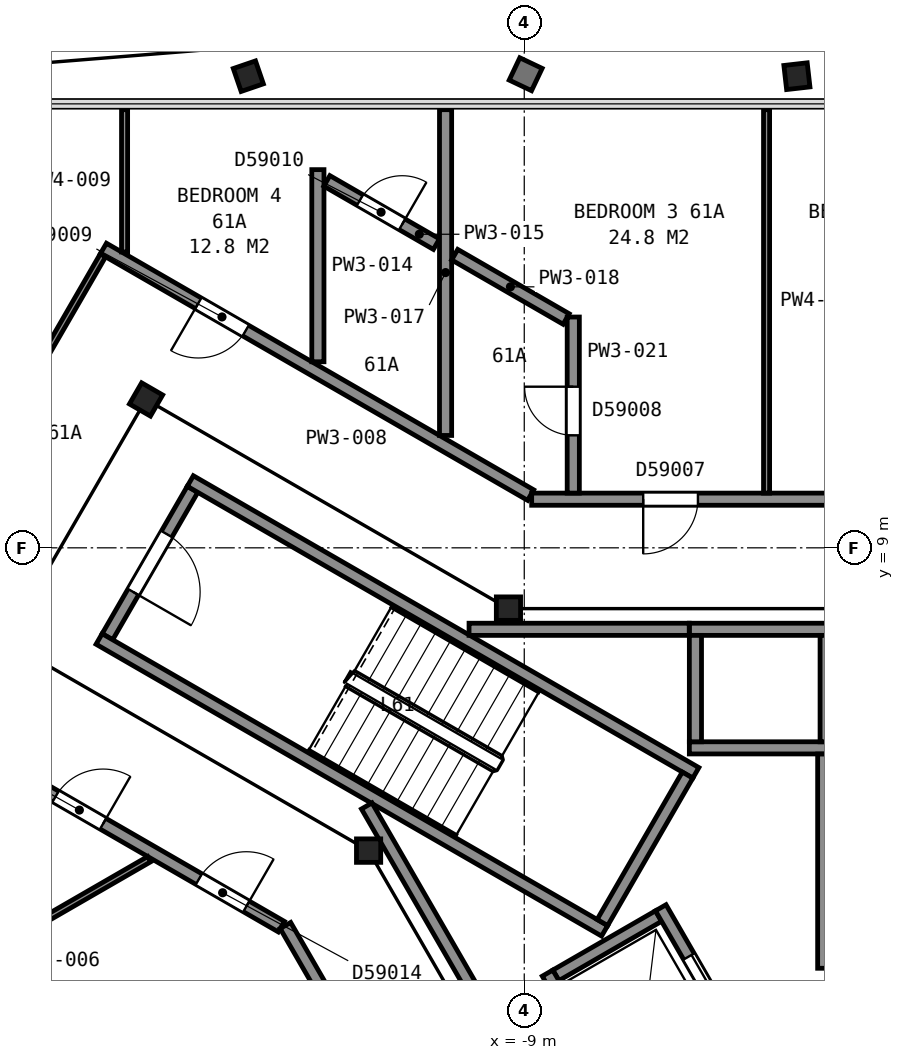
"""IFC4 building model, lengths in metres.
Left out: names, types, materials, properties, quantities, classifications, styles, units other than length and angle.
Written with IfcOpenShell. Run it as: python <this file> out.ifc"""

import sys

from ifc_helpers import new_model, si_unit, direction, frame, frame_2d, origin, origin_2d, place, context, subcontext, project, spatial, rectangle, i_section, extrude, element, fill, save


model = new_model("IFC4")
c1 = context("Model", 3, precision=1e-05, world=origin(), true_north=direction((0.0, 1.0)))
c2 = subcontext(c1, "Body", "Model", "MODEL_VIEW")
j1 = project(units=[si_unit("LENGTHUNIT", "METRE"), si_unit("PLANEANGLEUNIT", "RADIAN")], contexts=[c1])
p1 = place(None, origin())
s1 = spatial("IfcSite", under=j1, at=p1, CompositionType="ELEMENT")
p2 = place(p1, origin())
s2 = spatial("IfcBuilding", under=s1, at=p2, CompositionType="ELEMENT")
p3 = place(p2, frame((0.0, 0.0, 243.4)))
s3 = spatial("IfcBuildingStorey", under=s2, at=p3, CompositionType="ELEMENT", Elevation=243.4)
p4 = place(p3, frame((-4.491, 16.537, 0.035), z_axis=(-0.021208876796, 0.185858474847, 0.982347601856), x_axis=(0.99976630856, -0.000169989892, 0.021617108328)))
e1 = element("IfcColumn", 1, at=p4, inside=s3, PredefinedType="COLUMN", context=c2, shape_type="SweptSolid", body=[
    extrude(i_section(OverallWidth=0.399, OverallDepth=0.386, WebThickness=0.021, FlangeThickness=0.033, FilletRadius=0.015, at=origin_2d()), origin(), (0.0, 0.0, 1.0), 3.695),
])
p5 = place(p3, frame((-13.462, 16.537, 0.035), z_axis=(-0.063578143467, 0.185524188354, 0.98058074385), x_axis=(0.997902892786, -0.000144647774, 0.064728630807)))
e2 = element("IfcColumn", 2, at=p5, inside=s3, PredefinedType="COLUMN", context=c2, shape_type="SweptSolid", body=[
    extrude(i_section(OverallWidth=0.399, OverallDepth=0.386, WebThickness=0.021, FlangeThickness=0.033, FilletRadius=0.015, at=origin_2d()), origin(), (0.0, 0.0, 1.0), 3.702),
])
p6 = place(p3, frame((-9.26, 8.0, 0.0), z_axis=(0.0, 0.0, 1.0), x_axis=(1.0, 0.0, 0.0)))
e3 = element("IfcColumn", 3, at=p6, inside=s3, PredefinedType="COLUMN", context=c2, shape_type="SweptSolid", body=[
    extrude(i_section(OverallWidth=0.399, OverallDepth=0.386, WebThickness=0.021, FlangeThickness=0.033, FilletRadius=0.015, at=origin_2d()), origin(), (0.0, 0.0, 1.0), 3.7),
])
p7 = place(p3, frame((-15.22, 11.44, 0.0), z_axis=(0.0, 0.0, 1.0), x_axis=(0.5, 0.866025403784, 0.0)))
e4 = element("IfcColumn", 4, at=p7, inside=s3, PredefinedType="COLUMN", context=c2, shape_type="SweptSolid", body=[
    extrude(i_section(OverallWidth=0.401, OverallDepth=0.399, WebThickness=0.025, FlangeThickness=0.04, FilletRadius=0.015, at=origin_2d()), origin(), (0.0, 0.0, 1.0), 3.7),
])
p8 = place(p3, frame((-11.56, 4.02, 0.0), z_axis=(0.0, 0.0, 1.0), x_axis=(1.0, 0.0, 0.0)))
e5 = element("IfcColumn", 5, at=p8, inside=s3, PredefinedType="COLUMN", context=c2, shape_type="SweptSolid", body=[
    extrude(i_section(OverallWidth=0.399, OverallDepth=0.386, WebThickness=0.021, FlangeThickness=0.033, FilletRadius=0.015, at=origin_2d()), origin(), (0.0, 0.0, 1.0), 3.7),
])
p9 = place(p3, frame((-14.455, 9.962, 0.0), z_axis=(0.0, 0.0, 1.0), x_axis=(-0.500049511043, -0.865996816683, 0.0)))
e6 = element("IfcWall", 6, at=p9, inside=s3, PredefinedType="PARTITIONING", context=c2, shape_type="SweptSolid", body=[
    extrude(rectangle(XDim=2.8, YDim=0.2, at=frame_2d((1.4, 0.0))), origin(), (0.0, 0.0, 1.0), 3.45),
])
p10 = place(p9, frame((0.85, 0.0, 0.0)))
e7 = element("IfcOpeningElement", 7, at=p10, cuts=e6, PredefinedType="OPENING", context=c2, shape_type="SweptSolid", body=[
    extrude(rectangle(XDim=1.1, YDim=2.1, at=frame_2d((0.55, 1.05))), frame((0.0, 0.11, 0.0), z_axis=(0.0, -1.0, 0.0), x_axis=(1.0, 0.0, 0.0)), (0.0, 0.0, 1.0), 0.22),
])
for number, where, z_axis, x_axis in (
    (8, (-7.678, 2.701, 0.0), (0.0, 0.0, 1.0), (-0.866, 0.5, 0.0)),
    (9, (-6.178, 5.299, 0.0), (0.0, 0.0, 1.0), (-0.866, 0.5, 0.0)),
):
    element("IfcWall", number, at=place(p3, frame(where, z_axis=z_axis, x_axis=x_axis)), inside=s3, PredefinedType="PARTITIONING", context=c2, shape_type="SweptSolid", body=[
        extrude(rectangle(XDim=9.6, YDim=0.2, at=frame_2d((4.8, 0.0))), origin(), (0.0, 0.0, 1.0), 3.45),
    ])
p11 = place(p3, frame((-6.315, 5.262, 0.0), z_axis=(0.0, 0.0, 1.0), x_axis=(-0.500049511043, -0.865996816683, 0.0)))
e10 = element("IfcWall", 10, at=p11, inside=s3, PredefinedType="PARTITIONING", context=c2, shape_type="SweptSolid", body=[
    extrude(rectangle(XDim=2.8, YDim=0.2, at=frame_2d((1.4, 0.0))), origin(), (0.0, 0.0, 1.0), 3.45),
])
for number, where, z_axis, x_axis in (
    (11, (-6.285, 5.71, 0.0), (0.0, 0.0, 1.0), (1.0, 0.0, 0.0)),
    (12, (-6.285, 7.66, 0.0), (0.0, 0.0, 1.0), (1.0, 0.0, 0.0)),
):
    element("IfcWall", number, at=place(p3, frame(where, z_axis=z_axis, x_axis=x_axis)), inside=s3, PredefinedType="PARTITIONING", context=c2, shape_type="SweptSolid", body=[
        extrude(rectangle(XDim=2.35, YDim=0.2, at=frame_2d((1.175, 0.0))), origin(), (0.0, 0.0, 1.0), 3.7),
    ])
p12 = place(p3, frame((-8.48, 1.969, 0.0), z_axis=(0.0, 0.0, 1.0), x_axis=(0.866000020948, 0.500043961785, 0.0)))
e13 = element("IfcWall", 13, at=p12, inside=s3, PredefinedType="PARTITIONING", context=c2, shape_type="SweptSolid", body=[
    extrude(rectangle(XDim=1.95, YDim=0.2, at=frame_2d((0.975, 0.0))), origin(), (0.0, 0.0, 1.0), 3.7),
])
for number, where, z_axis, x_axis in (
    (14, (-4.035, 5.81, 0.0), (0.0, 0.0, 1.0), (0.0, 1.0, 0.0)),
    (15, (-6.185, 5.81, 0.0), (0.0, 0.0, 1.0), (0.0, 1.0, 0.0)),
):
    element("IfcWall", number, at=place(p3, frame(where, z_axis=z_axis, x_axis=x_axis)), inside=s3, PredefinedType="PARTITIONING", context=c2, shape_type="SweptSolid", body=[
        extrude(rectangle(XDim=1.75, YDim=0.2, at=frame_2d((0.875, 0.0))), origin(), (0.0, 0.0, 1.0), 3.7),
    ])
p13 = place(p3, frame((-5.28, 0.525, 0.0), z_axis=(0.0, 0.0, 1.0), x_axis=(-0.500037662692, 0.866003658127, 0.0)))
e16 = element("IfcWall", 16, at=p13, inside=s3, PredefinedType="PARTITIONING", context=c2, shape_type="SweptSolid", body=[
    extrude(rectangle(XDim=2.95, YDim=0.2, at=frame_2d((1.475, 0.0))), origin(), (0.0, 0.0, 1.0), 3.7),
])
p14 = place(p13, frame((0.925, 0.0, 0.0)))
e17 = element("IfcOpeningElement", 17, at=p14, cuts=e16, PredefinedType="OPENING", context=c2, shape_type="SweptSolid", body=[
    extrude(rectangle(XDim=1.1, YDim=2.1, at=frame_2d((0.55, 1.05))), frame((0.0, 0.11, 0.0), z_axis=(0.0, -1.0, 0.0), x_axis=(1.0, 0.0, 0.0)), (0.0, 0.0, 1.0), 0.22),
])
p15 = place(p3, frame((-7.242, -0.376, 0.0), z_axis=(0.0, 0.0, 1.0), x_axis=(-0.499996545922, 0.866027397988, 0.0)))
e18 = element("IfcWall", 18, at=p15, inside=s3, PredefinedType="PARTITIONING", context=c2, shape_type="SweptSolid", body=[
    extrude(rectangle(XDim=2.75, YDim=0.2, at=frame_2d((1.375, 0.0))), origin(), (0.0, 0.0, 1.0), 3.7),
])
p16 = place(p3, frame((-11.591, 4.755, 0.0), z_axis=(0.0, 0.0, 1.0), x_axis=(0.500043977787, -0.866000011708, 0.0)))
e19 = element("IfcWall", 19, at=p16, inside=s3, PredefinedType="PARTITIONING", context=c2, shape_type="SweptSolid", body=[
    extrude(rectangle(XDim=6.617, YDim=0.2, at=frame_2d((3.308, 0.0))), origin(), (0.0, 0.0, 1.0), 3.45),
])
p17 = place(p16, frame((3.695, 0.0, 0.0)))
e20 = element("IfcOpeningElement", 20, at=p17, cuts=e19, PredefinedType="OPENING", context=c2, shape_type="SweptSolid", body=[
    extrude(rectangle(XDim=1.8, YDim=2.1, at=frame_2d((0.9, 1.05))), frame((0.0, 0.11, 0.0), z_axis=(0.0, -1.0, 0.0), x_axis=(1.0, 0.0, 0.0)), (0.0, 0.0, 1.0), 0.22),
])
p18 = place(p3, frame((-9.908, 7.66, 0.0), z_axis=(0.0, 0.0, 1.0), x_axis=(1.0, 0.0, 0.0)))
e21 = element("IfcWall", 21, at=p18, inside=s3, PredefinedType="PARTITIONING", context=c2, shape_type="SweptSolid", body=[
    extrude(rectangle(XDim=3.621, YDim=0.2, at=frame_2d((1.811, 0.0))), origin(), (0.0, 0.0, 1.0), 3.45),
])
p19 = place(p3, frame((-4.1, 2.085, 0.0), z_axis=(0.0, 0.0, 1.0), x_axis=(0.0, 1.0, 0.0)))
e22 = element("IfcWall", 22, at=p19, inside=s3, PredefinedType="PARTITIONING", context=c2, shape_type="SweptSolid", body=[
    extrude(rectangle(XDim=3.523, YDim=0.15, at=frame_2d((1.761, 0.0))), origin(), (0.0, 0.0, 1.0), 3.45),
])
p20 = place(p3, frame((-19.93, 6.888, 0.0), z_axis=(0.0, 0.0, 1.0), x_axis=(0.500420003794, 0.865782778648, 0.0)))
e23 = element("IfcWall", 23, at=p20, inside=s3, PredefinedType="PARTITIONING", context=c2, shape_type="SweptSolid", body=[
    extrude(rectangle(XDim=7.997, YDim=0.1, at=frame_2d((3.999, 0.0))), origin(), (0.0, 0.0, 1.0), 2.713),
])
p21 = place(p20, frame((3.4, 0.0, 0.0)))
e24 = element("IfcOpeningElement", 24, at=p21, cuts=e23, PredefinedType="OPENING", context=c2, shape_type="SweptSolid", body=[
    extrude(rectangle(XDim=1.2, YDim=2.1, at=frame_2d((0.6, 1.05))), frame((0.0, 0.06, 0.0), z_axis=(0.0, -1.0, 0.0), x_axis=(1.0, 0.0, 0.0)), (0.0, 0.0, 1.0), 0.12),
])
p22 = place(p3, frame((-12.995, 2.77, 0.0), z_axis=(0.0, 0.0, 1.0), x_axis=(-0.866100425926, 0.499870035319, 0.0)))
e25 = element("IfcWall", 25, at=p22, inside=s3, PredefinedType="PARTITIONING", context=c2, shape_type="SweptSolid", body=[
    extrude(rectangle(XDim=8.115, YDim=0.2, at=frame_2d((4.058, 0.0))), origin(), (0.0, 0.0, 1.0), 2.713),
])
p23 = place(p22, frame((3.385, 0.0, 0.0)))
e26 = element("IfcOpeningElement", 26, at=p23, cuts=e25, PredefinedType="OPENING", context=c2, shape_type="SweptSolid", body=[
    extrude(rectangle(XDim=0.9, YDim=2.1, at=frame_2d((0.45, 1.05))), frame((0.0, 0.11, 0.0), z_axis=(0.0, -1.0, 0.0), x_axis=(1.0, 0.0, 0.0)), (0.0, 0.0, 1.0), 0.22),
])
p24 = place(p22, frame((0.665, 0.0, 0.0)))
e27 = element("IfcOpeningElement", 27, at=p24, cuts=e25, PredefinedType="OPENING", context=c2, shape_type="SweptSolid", body=[
    extrude(rectangle(XDim=0.9, YDim=2.1, at=frame_2d((0.45, 1.05))), frame((0.0, 0.11, 0.0), z_axis=(0.0, -1.0, 0.0), x_axis=(1.0, 0.0, 0.0)), (0.0, 0.0, 1.0), 0.22),
])
p25 = place(p3, frame((-19.507, 1.375, 0.0), z_axis=(0.0, 0.0, 1.0), x_axis=(0.86604843891, 0.499960099869, 0.0)))
e28 = element("IfcWall", 28, at=p25, inside=s3, PredefinedType="PARTITIONING", context=c2, shape_type="SweptSolid", body=[
    extrude(rectangle(XDim=5.01, YDim=0.1, at=frame_2d((2.505, 0.0))), origin(), (0.0, 0.0, 1.0), 2.713),
])
p26 = place(p3, frame((-15.921, 13.923, 0.0), z_axis=(0.0, 0.0, 1.0), x_axis=(0.866079355551, -0.499906541154, 0.0)))
e29 = element("IfcWall", 29, at=p26, inside=s3, PredefinedType="PARTITIONING", context=c2, shape_type="SweptSolid", body=[
    extrude(rectangle(XDim=8.113, YDim=0.2, at=frame_2d((4.056, 0.0))), origin(), (0.0, 0.0, 1.0), 2.713),
])
p27 = place(p26, frame((1.802, 0.0, 0.0)))
e30 = element("IfcOpeningElement", 30, at=p27, cuts=e29, PredefinedType="OPENING", context=c2, shape_type="SweptSolid", body=[
    extrude(rectangle(XDim=0.9, YDim=2.1, at=frame_2d((0.45, 1.05))), frame((0.0, 0.11, 0.0), z_axis=(0.0, -1.0, 0.0), x_axis=(1.0, 0.0, 0.0)), (0.0, 0.0, 1.0), 0.22),
])
p28 = place(p3, frame((-15.573, 13.866, 0.0), z_axis=(0.0, 0.0, 1.0), x_axis=(0.0, 1.0, 0.0)))
e31 = element("IfcWall", 31, at=p28, inside=s3, PredefinedType="PARTITIONING", context=c2, shape_type="SweptSolid", body=[
    extrude(rectangle(XDim=2.34, YDim=0.1, at=frame_2d((1.17, 0.0))), origin(), (0.0, 0.0, 1.0), 2.713),
])
p29 = place(p3, frame((-4.077, -12.543, 0.0), z_axis=(0.0, 0.0, 1.0), x_axis=(-0.499968768298, 0.866043434665, 0.0)))
e32 = element("IfcWall", 32, at=p29, inside=s3, PredefinedType="PARTITIONING", context=c2, shape_type="SweptSolid", body=[
    extrude(rectangle(XDim=17.703, YDim=0.2, at=frame_2d((8.852, 0.0))), origin(), (0.0, 0.0, 1.0), 2.713),
])
p30 = place(p29, frame((11.052, 0.0, 0.0)))
e33 = element("IfcOpeningElement", 33, at=p30, cuts=e32, PredefinedType="OPENING", context=c2, shape_type="SweptSolid", body=[
    extrude(rectangle(XDim=0.9, YDim=2.1, at=frame_2d((0.45, 1.05))), frame((0.0, 0.11, 0.0), z_axis=(0.0, -1.0, 0.0), x_axis=(1.0, 0.0, 0.0)), (0.0, 0.0, 1.0), 0.22),
])
p31 = place(p29, frame((7.098, 0.0, 0.0)))
e34 = element("IfcOpeningElement", 34, at=p31, cuts=e32, PredefinedType="OPENING", context=c2, shape_type="SweptSolid", body=[
    extrude(rectangle(XDim=0.9, YDim=2.1, at=frame_2d((0.45, 1.05))), frame((0.0, 0.11, 0.0), z_axis=(0.0, -1.0, 0.0), x_axis=(1.0, 0.0, 0.0)), (0.0, 0.0, 1.0), 0.22),
])
p32 = place(p29, frame((2.099, 0.0, 0.0)))
e35 = element("IfcOpeningElement", 35, at=p32, cuts=e32, PredefinedType="OPENING", context=c2, shape_type="SweptSolid", body=[
    extrude(rectangle(XDim=0.9, YDim=2.1, at=frame_2d((0.45, 1.05))), frame((0.0, 0.11, 0.0), z_axis=(0.0, -1.0, 0.0), x_axis=(1.0, 0.0, 0.0)), (0.0, 0.0, 1.0), 0.22),
])
p33 = place(p3, frame((-12.394, 12.06, 0.0), z_axis=(0.0, 0.0, 1.0), x_axis=(0.0, 1.0, 0.0)))
e36 = element("IfcWall", 36, at=p33, inside=s3, PredefinedType="PARTITIONING", context=c2, shape_type="SweptSolid", body=[
    extrude(rectangle(XDim=3.16, YDim=0.2, at=frame_2d((1.58, 0.0))), origin(), (0.0, 0.0, 1.0), 2.713),
])
p34 = place(p3, frame((-10.444, 13.995, 0.0), z_axis=(0.0, 0.0, 1.0), x_axis=(-0.866134808485, 0.499810457605, 0.0)))
e37 = element("IfcWall", 37, at=p34, inside=s3, PredefinedType="PARTITIONING", context=c2, shape_type="SweptSolid", body=[
    extrude(rectangle(XDim=2.081, YDim=0.2, at=frame_2d((1.041, 0.0))), origin(), (0.0, 0.0, 1.0), 2.713),
])
p35 = place(p34, frame((0.651, 0.0, 0.0)))
e38 = element("IfcOpeningElement", 38, at=p35, cuts=e37, PredefinedType="OPENING", context=c2, shape_type="SweptSolid", body=[
    extrude(rectangle(XDim=0.8, YDim=2.1, at=frame_2d((0.4, 1.05))), frame((0.0, 0.11, 0.0), z_axis=(0.0, -1.0, 0.0), x_axis=(1.0, 0.0, 0.0)), (0.0, 0.0, 1.0), 0.22),
])
p36 = place(p3, frame((-10.294, 10.848, 0.0), z_axis=(0.0, 0.0, 1.0), x_axis=(0.0, 1.0, 0.0)))
e39 = element("IfcWall", 39, at=p36, inside=s3, PredefinedType="PARTITIONING", context=c2, shape_type="SweptSolid", body=[
    extrude(rectangle(XDim=5.358, YDim=0.2, at=frame_2d((2.679, 0.0))), origin(), (0.0, 0.0, 1.0), 2.713),
])
p37 = place(p3, frame((-10.144, 13.822, 0.0), z_axis=(0.0, 0.0, 1.0), x_axis=(0.866062654302, -0.49993547466, 0.0)))
e40 = element("IfcWall", 40, at=p37, inside=s3, PredefinedType="PARTITIONING", context=c2, shape_type="SweptSolid", body=[
    extrude(rectangle(XDim=2.116, YDim=0.2, at=frame_2d((1.058, 0.0))), origin(), (0.0, 0.0, 1.0), 2.713),
])
p38 = place(p3, frame((-8.878, 9.8, 0.0), z_axis=(0.0, 0.0, 1.0), x_axis=(1.0, 0.0, 0.0)))
e41 = element("IfcWall", 41, at=p38, inside=s3, PredefinedType="PARTITIONING", context=c2, shape_type="SweptSolid", body=[
    extrude(rectangle(XDim=17.756, YDim=0.2, at=frame_2d((8.878, 0.0))), origin(), (0.0, 0.0, 1.0), 2.713),
])
p39 = place(p38, frame((12.792, 0.0, 0.0)))
e42 = element("IfcOpeningElement", 42, at=p39, cuts=e41, PredefinedType="OPENING", context=c2, shape_type="SweptSolid", body=[
    extrude(rectangle(XDim=1.2, YDim=2.1, at=frame_2d((0.6, 1.05))), frame((0.0, 0.11, 0.0), z_axis=(0.0, -1.0, 0.0), x_axis=(1.0, 0.0, 0.0)), (0.0, 0.0, 1.0), 0.22),
])
p40 = place(p38, frame((5.013, 0.0, 0.0)))
e43 = element("IfcOpeningElement", 43, at=p40, cuts=e41, PredefinedType="OPENING", context=c2, shape_type="SweptSolid", body=[
    extrude(rectangle(XDim=0.9, YDim=2.1, at=frame_2d((0.45, 1.05))), frame((0.0, 0.11, 0.0), z_axis=(0.0, -1.0, 0.0), x_axis=(1.0, 0.0, 0.0)), (0.0, 0.0, 1.0), 0.22),
])
p41 = place(p38, frame((1.834, 0.0, 0.0)))
e44 = element("IfcOpeningElement", 44, at=p41, cuts=e41, PredefinedType="OPENING", context=c2, shape_type="SweptSolid", body=[
    extrude(rectangle(XDim=0.9, YDim=2.1, at=frame_2d((0.45, 1.05))), frame((0.0, 0.11, 0.0), z_axis=(0.0, -1.0, 0.0), x_axis=(1.0, 0.0, 0.0)), (0.0, 0.0, 1.0), 0.22),
])
p42 = place(p3, frame((-8.194, 9.9, 0.0), z_axis=(0.0, 0.0, 1.0), x_axis=(0.0, 1.0, 0.0)))
e45 = element("IfcWall", 45, at=p42, inside=s3, PredefinedType="PARTITIONING", context=c2, shape_type="SweptSolid", body=[
    extrude(rectangle(XDim=2.896, YDim=0.2, at=frame_2d((1.448, 0.0))), origin(), (0.0, 0.0, 1.0), 2.713),
])
p43 = place(p42, frame((0.95, 0.0, 0.0)))
e46 = element("IfcOpeningElement", 46, at=p43, cuts=e45, PredefinedType="OPENING", context=c2, shape_type="SweptSolid", body=[
    extrude(rectangle(XDim=0.8, YDim=2.1, at=frame_2d((0.4, 1.05))), frame((0.0, 0.11, 0.0), z_axis=(0.0, -1.0, 0.0), x_axis=(1.0, 0.0, 0.0)), (0.0, 0.0, 1.0), 0.22),
])
p44 = place(p3, frame((-5.015, 9.9, 0.0), z_axis=(0.0, 0.0, 1.0), x_axis=(0.0, 1.0, 0.0)))
e47 = element("IfcWall", 47, at=p44, inside=s3, PredefinedType="PARTITIONING", context=c2, shape_type="SweptSolid", body=[
    extrude(rectangle(XDim=6.306, YDim=0.1, at=frame_2d((3.153, 0.0))), origin(), (0.0, 0.0, 1.0), 2.713),
])
p45 = place(p10, origin())
e48 = element("IfcDoor", 48, at=p45, inside=s3, OperationType="SINGLE_SWING_RIGHT", PredefinedType="DOOR", context=c2, shape_type="SweptSolid", body=[
    extrude(rectangle(XDim=1.1, YDim=2.1, at=frame_2d((0.55, 1.05))), frame((0.0, 0.025, 0.0), z_axis=(0.0, -1.0, 0.0), x_axis=(1.0, 0.0, 0.0)), (0.0, 0.0, 1.0), 0.05),
])
fill(e7, e48)
p46 = place(p14, origin())
e49 = element("IfcDoor", 49, at=p46, inside=s3, OperationType="SLIDING_TO_LEFT", PredefinedType="DOOR", context=c2, shape_type="SweptSolid", body=[
    extrude(rectangle(XDim=1.1, YDim=2.1, at=frame_2d((0.55, 1.05))), frame((0.0, 0.025, 0.0), z_axis=(0.0, -1.0, 0.0), x_axis=(1.0, 0.0, 0.0)), (0.0, 0.0, 1.0), 0.05),
])
fill(e17, e49)
p47 = place(p23, origin())
e50 = element("IfcDoor", 50, at=p47, inside=s3, OperationType="SINGLE_SWING_LEFT", PredefinedType="DOOR", context=c2, shape_type="SweptSolid", body=[
    extrude(rectangle(XDim=0.9, YDim=2.1, at=frame_2d((0.45, 1.05))), frame((0.0, 0.025, 0.0), z_axis=(0.0, -1.0, 0.0), x_axis=(1.0, 0.0, 0.0)), (0.0, 0.0, 1.0), 0.05),
])
fill(e26, e50)
p48 = place(p24, origin())
e51 = element("IfcDoor", 51, at=p48, inside=s3, OperationType="SINGLE_SWING_LEFT", PredefinedType="DOOR", context=c2, shape_type="SweptSolid", body=[
    extrude(rectangle(XDim=0.9, YDim=2.1, at=frame_2d((0.45, 1.05))), frame((0.0, 0.025, 0.0), z_axis=(0.0, -1.0, 0.0), x_axis=(1.0, 0.0, 0.0)), (0.0, 0.0, 1.0), 0.05),
])
fill(e27, e51)
p49 = place(p27, origin())
e52 = element("IfcDoor", 52, at=p49, inside=s3, OperationType="SINGLE_SWING_LEFT", PredefinedType="DOOR", context=c2, shape_type="SweptSolid", body=[
    extrude(rectangle(XDim=0.9, YDim=2.1, at=frame_2d((0.45, 1.05))), frame((0.0, 0.025, 0.0), z_axis=(0.0, -1.0, 0.0), x_axis=(1.0, 0.0, 0.0)), (0.0, 0.0, 1.0), 0.05),
])
fill(e30, e52)
p50 = place(p35, origin())
e53 = element("IfcDoor", 53, at=p50, inside=s3, OperationType="SINGLE_SWING_LEFT", PredefinedType="DOOR", context=c2, shape_type="SweptSolid", body=[
    extrude(rectangle(XDim=0.8, YDim=2.1, at=frame_2d((0.4, 1.05))), frame((0.0, 0.025, 0.0), z_axis=(0.0, -1.0, 0.0), x_axis=(1.0, 0.0, 0.0)), (0.0, 0.0, 1.0), 0.05),
])
fill(e38, e53)
p51 = place(p41, origin())
e54 = element("IfcDoor", 54, at=p51, inside=s3, OperationType="SINGLE_SWING_LEFT", PredefinedType="DOOR", context=c2, shape_type="SweptSolid", body=[
    extrude(rectangle(XDim=0.9, YDim=2.1, at=frame_2d((0.45, 1.05))), frame((0.0, 0.025, 0.0), z_axis=(0.0, -1.0, 0.0), x_axis=(1.0, 0.0, 0.0)), (0.0, 0.0, 1.0), 0.05),
])
fill(e44, e54)
p52 = place(p43, origin())
e55 = element("IfcDoor", 55, at=p52, inside=s3, OperationType="SINGLE_SWING_RIGHT", PredefinedType="DOOR", context=c2, shape_type="SweptSolid", body=[
    extrude(rectangle(XDim=0.8, YDim=2.1, at=frame_2d((0.4, 1.05))), frame((0.0, 0.025, 0.0), z_axis=(0.0, -1.0, 0.0), x_axis=(1.0, 0.0, 0.0)), (0.0, 0.0, 1.0), 0.05),
])
fill(e46, e55)
save(model, sys.argv[1])
